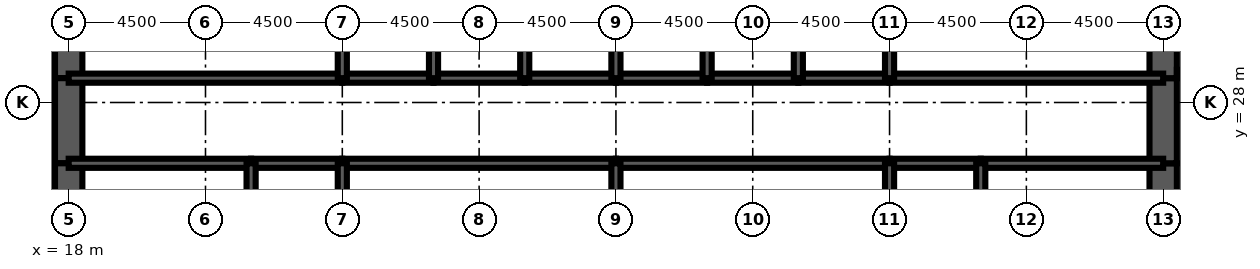
"""IFC4 building model, lengths in metres.
Left out: names, types, materials, properties, quantities, classifications, styles, units other than length and angle.
Written with IfcOpenShell. Run it as: python <this file> out.ifc"""

import sys

from ifc_helpers import new_model, si_unit, direction, frame, frame_2d, origin, place, context, subcontext, project, spatial, rectangle, extrude, element, fill, save


model = new_model("IFC4")
c1 = context("Model", 3, precision=1e-05, world=origin(), true_north=direction((0.0, 1.0)))
c2 = subcontext(c1, "Body", "Model", "MODEL_VIEW")
j1 = project(units=[si_unit("LENGTHUNIT", "METRE"), si_unit("PLANEANGLEUNIT", "RADIAN")], contexts=[c1])
p1 = place(None, origin())
s1 = spatial("IfcSite", under=j1, at=p1, CompositionType="ELEMENT")
p2 = place(p1, origin())
s2 = spatial("IfcBuilding", under=s1, at=p2, CompositionType="ELEMENT")
p3 = place(p2, origin())
s3 = spatial("IfcBuildingStorey", under=s2, at=p3, CompositionType="ELEMENT", Elevation=0.0)
p4 = place(p3, frame((18.0, 32.0, 0.0), z_axis=(0.0, 0.0, 1.0), x_axis=(0.0, -1.0, 0.0)))
e1 = element("IfcWall", 1, at=p4, inside=s3, PredefinedType="SHEAR", context=c2, shape_type="SweptSolid", body=[
    extrude(rectangle(XDim=3.2, YDim=0.9, at=frame_2d((1.6, 0.0))), origin(), (0.0, 0.0, 1.0), 6.0),
])
p5 = place(p3, frame((18.0, 28.8, 0.0), z_axis=(0.0, 0.0, 1.0), x_axis=(0.0, -1.0, 0.0)))
e2 = element("IfcWall", 2, at=p5, inside=s3, PredefinedType="SHEAR", context=c2, shape_type="SweptSolid", body=[
    extrude(rectangle(XDim=2.8, YDim=0.9, at=frame_2d((1.4, 0.0))), origin(), (0.0, 0.0, 1.0), 6.0),
])
p6 = place(p5, frame((0.4, 0.0, 0.0)))
e3 = element("IfcOpeningElement", 3, at=p6, cuts=e2, PredefinedType="OPENING", context=c2, shape_type="SweptSolid", body=[
    extrude(rectangle(XDim=1.8, YDim=2.1, at=frame_2d((0.9, 1.05))), frame((0.0, 0.46, 0.0), z_axis=(0.0, -1.0, 0.0), x_axis=(1.0, 0.0, 0.0)), (0.0, 0.0, 1.0), 0.92),
])
for number, where, z_axis, x_axis in (
    (4, (18.0, 26.0, 0.0), (0.0, 0.0, 1.0), (0.0, -1.0, 0.0)),
    (5, (54.0, 22.0, 0.0), (0.0, 0.0, 1.0), (0.0, 1.0, 0.0)),
):
    element("IfcWall", number, at=place(p3, frame(where, z_axis=z_axis, x_axis=x_axis)), inside=s3, PredefinedType="SHEAR", context=c2, shape_type="SweptSolid", body=[
        extrude(rectangle(XDim=4.0, YDim=0.9, at=frame_2d((2.0, 0.0))), origin(), (0.0, 0.0, 1.0), 6.0),
    ])
p7 = place(p3, frame((54.0, 26.0, 0.0), z_axis=(0.0, 0.0, 1.0), x_axis=(0.0, 1.0, 0.0)))
e6 = element("IfcWall", 6, at=p7, inside=s3, PredefinedType="SHEAR", context=c2, shape_type="SweptSolid", body=[
    extrude(rectangle(XDim=2.8, YDim=0.9, at=frame_2d((1.4, 0.0))), origin(), (0.0, 0.0, 1.0), 6.0),
])
p8 = place(p7, frame((0.6, 0.0, 0.0)))
e7 = element("IfcOpeningElement", 7, at=p8, cuts=e6, PredefinedType="OPENING", context=c2, shape_type="SweptSolid", body=[
    extrude(rectangle(XDim=1.8, YDim=2.1, at=frame_2d((0.9, 1.05))), frame((0.0, 0.46, 0.0), z_axis=(0.0, -1.0, 0.0), x_axis=(1.0, 0.0, 0.0)), (0.0, 0.0, 1.0), 0.92),
])
p9 = place(p3, frame((54.0, 28.8, 0.0), z_axis=(0.0, 0.0, 1.0), x_axis=(0.0, 1.0, 0.0)))
e8 = element("IfcWall", 8, at=p9, inside=s3, PredefinedType="SHEAR", context=c2, shape_type="SweptSolid", body=[
    extrude(rectangle(XDim=3.2, YDim=0.9, at=frame_2d((1.6, 0.0))), origin(), (0.0, 0.0, 1.0), 6.0),
])
p10 = place(p3, frame((18.0, 28.8, 0.0), z_axis=(0.0, 0.0, 1.0), x_axis=(1.0, 0.0, 0.0)))
e9 = element("IfcWall", 9, at=p10, inside=s3, PredefinedType="SOLIDWALL", context=c2, shape_type="SweptSolid", body=[
    extrude(rectangle(XDim=9.0, YDim=0.3, at=frame_2d((4.5, 0.0))), origin(), (0.0, 0.0, 1.0), 6.0),
])
p11 = place(p10, frame((0.65, 0.0, 0.0)))
e10 = element("IfcOpeningElement", 10, at=p11, cuts=e9, PredefinedType="OPENING", context=c2, shape_type="SweptSolid", body=[
    extrude(rectangle(XDim=1.0, YDim=2.1, at=frame_2d((0.5, 1.05))), frame((0.0, 0.16, 0.0), z_axis=(0.0, -1.0, 0.0), x_axis=(1.0, 0.0, 0.0)), (0.0, 0.0, 1.0), 0.32),
])
p12 = place(p3, frame((27.0, 28.8, 0.0), z_axis=(0.0, 0.0, 1.0), x_axis=(1.0, 0.0, 0.0)))
e11 = element("IfcWall", 11, at=p12, inside=s3, PredefinedType="SOLIDWALL", context=c2, shape_type="SweptSolid", body=[
    extrude(rectangle(XDim=3.0, YDim=0.3, at=frame_2d((1.5, 0.0))), origin(), (0.0, 0.0, 1.0), 6.0),
])
p13 = place(p12, frame((0.95, 0.0, 0.0)))
e12 = element("IfcOpeningElement", 12, at=p13, cuts=e11, PredefinedType="OPENING", context=c2, shape_type="SweptSolid", body=[
    extrude(rectangle(XDim=1.1, YDim=2.2, at=frame_2d((0.55, 1.1))), frame((0.0, 0.16, 0.0), z_axis=(0.0, -1.0, 0.0), x_axis=(1.0, 0.0, 0.0)), (0.0, 0.0, 1.0), 0.32),
])
p14 = place(p3, frame((30.0, 28.8, 0.0), z_axis=(0.0, 0.0, 1.0), x_axis=(1.0, 0.0, 0.0)))
e13 = element("IfcWall", 13, at=p14, inside=s3, PredefinedType="SOLIDWALL", context=c2, shape_type="SweptSolid", body=[
    extrude(rectangle(XDim=3.0, YDim=0.3, at=frame_2d((1.5, 0.0))), origin(), (0.0, 0.0, 1.0), 6.0),
])
p15 = place(p14, frame((0.95, 0.0, 0.0)))
e14 = element("IfcOpeningElement", 14, at=p15, cuts=e13, PredefinedType="OPENING", context=c2, shape_type="SweptSolid", body=[
    extrude(rectangle(XDim=1.1, YDim=2.2, at=frame_2d((0.55, 1.1))), frame((0.0, 0.16, 0.0), z_axis=(0.0, -1.0, 0.0), x_axis=(1.0, 0.0, 0.0)), (0.0, 0.0, 1.0), 0.32),
])
p16 = place(p3, frame((33.0, 28.8, 0.0), z_axis=(0.0, 0.0, 1.0), x_axis=(1.0, 0.0, 0.0)))
e15 = element("IfcWall", 15, at=p16, inside=s3, PredefinedType="SOLIDWALL", context=c2, shape_type="SweptSolid", body=[
    extrude(rectangle(XDim=3.0, YDim=0.3, at=frame_2d((1.5, 0.0))), origin(), (0.0, 0.0, 1.0), 6.0),
])
p17 = place(p16, frame((0.95, 0.0, 0.0)))
e16 = element("IfcOpeningElement", 16, at=p17, cuts=e15, PredefinedType="OPENING", context=c2, shape_type="SweptSolid", body=[
    extrude(rectangle(XDim=1.1, YDim=2.2, at=frame_2d((0.55, 1.1))), frame((0.0, 0.16, 0.0), z_axis=(0.0, -1.0, 0.0), x_axis=(1.0, 0.0, 0.0)), (0.0, 0.0, 1.0), 0.32),
])
p18 = place(p3, frame((36.0, 28.8, 0.0), z_axis=(0.0, 0.0, 1.0), x_axis=(1.0, 0.0, 0.0)))
e17 = element("IfcWall", 17, at=p18, inside=s3, PredefinedType="SOLIDWALL", context=c2, shape_type="SweptSolid", body=[
    extrude(rectangle(XDim=3.0, YDim=0.3, at=frame_2d((1.5, 0.0))), origin(), (0.0, 0.0, 1.0), 6.0),
])
p19 = place(p18, frame((0.95, 0.0, 0.0)))
e18 = element("IfcOpeningElement", 18, at=p19, cuts=e17, PredefinedType="OPENING", context=c2, shape_type="SweptSolid", body=[
    extrude(rectangle(XDim=1.1, YDim=2.2, at=frame_2d((0.55, 1.1))), frame((0.0, 0.16, 0.0), z_axis=(0.0, -1.0, 0.0), x_axis=(1.0, 0.0, 0.0)), (0.0, 0.0, 1.0), 0.32),
])
p20 = place(p3, frame((39.0, 28.8, 0.0), z_axis=(0.0, 0.0, 1.0), x_axis=(1.0, 0.0, 0.0)))
e19 = element("IfcWall", 19, at=p20, inside=s3, PredefinedType="SOLIDWALL", context=c2, shape_type="SweptSolid", body=[
    extrude(rectangle(XDim=3.0, YDim=0.3, at=frame_2d((1.5, 0.0))), origin(), (0.0, 0.0, 1.0), 6.0),
])
p21 = place(p20, frame((0.95, 0.0, 0.0)))
e20 = element("IfcOpeningElement", 20, at=p21, cuts=e19, PredefinedType="OPENING", context=c2, shape_type="SweptSolid", body=[
    extrude(rectangle(XDim=1.1, YDim=2.2, at=frame_2d((0.55, 1.1))), frame((0.0, 0.16, 0.0), z_axis=(0.0, -1.0, 0.0), x_axis=(1.0, 0.0, 0.0)), (0.0, 0.0, 1.0), 0.32),
])
p22 = place(p3, frame((42.0, 28.8, 0.0), z_axis=(0.0, 0.0, 1.0), x_axis=(1.0, 0.0, 0.0)))
e21 = element("IfcWall", 21, at=p22, inside=s3, PredefinedType="SOLIDWALL", context=c2, shape_type="SweptSolid", body=[
    extrude(rectangle(XDim=3.0, YDim=0.3, at=frame_2d((1.5, 0.0))), origin(), (0.0, 0.0, 1.0), 6.0),
])
p23 = place(p22, frame((0.95, 0.0, 0.0)))
e22 = element("IfcOpeningElement", 22, at=p23, cuts=e21, PredefinedType="OPENING", context=c2, shape_type="SweptSolid", body=[
    extrude(rectangle(XDim=1.1, YDim=2.2, at=frame_2d((0.55, 1.1))), frame((0.0, 0.16, 0.0), z_axis=(0.0, -1.0, 0.0), x_axis=(1.0, 0.0, 0.0)), (0.0, 0.0, 1.0), 0.32),
])
p24 = place(p3, frame((45.0, 28.8, 0.0), z_axis=(0.0, 0.0, 1.0), x_axis=(1.0, 0.0, 0.0)))
e23 = element("IfcWall", 23, at=p24, inside=s3, PredefinedType="SOLIDWALL", context=c2, shape_type="SweptSolid", body=[
    extrude(rectangle(XDim=9.0, YDim=0.3, at=frame_2d((4.5, 0.0))), origin(), (0.0, 0.0, 1.0), 6.0),
])
p25 = place(p24, frame((7.35, 0.0, 0.0)))
e24 = element("IfcOpeningElement", 24, at=p25, cuts=e23, PredefinedType="OPENING", context=c2, shape_type="SweptSolid", body=[
    extrude(rectangle(XDim=1.0, YDim=2.1, at=frame_2d((0.5, 1.05))), frame((0.0, 0.16, 0.0), z_axis=(0.0, -1.0, 0.0), x_axis=(1.0, 0.0, 0.0)), (0.0, 0.0, 1.0), 0.32),
])
p26 = place(p3, frame((18.0, 26.0, 0.0), z_axis=(0.0, 0.0, 1.0), x_axis=(1.0, 0.0, 0.0)))
e25 = element("IfcWall", 25, at=p26, inside=s3, PredefinedType="SOLIDWALL", context=c2, shape_type="SweptSolid", body=[
    extrude(rectangle(XDim=6.0, YDim=0.3, at=frame_2d((3.0, 0.0))), origin(), (0.0, 0.0, 1.0), 6.0),
])
p27 = place(p3, frame((24.0, 26.0, 0.0), z_axis=(0.0, 0.0, 1.0), x_axis=(1.0, 0.0, 0.0)))
e26 = element("IfcWall", 26, at=p27, inside=s3, PredefinedType="SOLIDWALL", context=c2, shape_type="SweptSolid", body=[
    extrude(rectangle(XDim=3.0, YDim=0.3, at=frame_2d((1.5, 0.0))), origin(), (0.0, 0.0, 1.0), 6.0),
])
for number, where, z_axis, x_axis in (
    (27, (27.0, 26.0, 0.0), (0.0, 0.0, 1.0), (1.0, 0.0, 0.0)),
    (28, (36.0, 26.0, 0.0), (0.0, 0.0, 1.0), (1.0, 0.0, 0.0)),
):
    element("IfcWall", number, at=place(p3, frame(where, z_axis=z_axis, x_axis=x_axis)), inside=s3, PredefinedType="SOLIDWALL", context=c2, shape_type="SweptSolid", body=[
        extrude(rectangle(XDim=9.0, YDim=0.3, at=frame_2d((4.5, 0.0))), origin(), (0.0, 0.0, 1.0), 6.0),
    ])
p28 = place(p3, frame((45.0, 26.0, 0.0), z_axis=(0.0, 0.0, 1.0), x_axis=(1.0, 0.0, 0.0)))
e29 = element("IfcWall", 29, at=p28, inside=s3, PredefinedType="SOLIDWALL", context=c2, shape_type="SweptSolid", body=[
    extrude(rectangle(XDim=3.0, YDim=0.3, at=frame_2d((1.5, 0.0))), origin(), (0.0, 0.0, 1.0), 6.0),
])
p29 = place(p3, frame((48.0, 26.0, 0.0), z_axis=(0.0, 0.0, 1.0), x_axis=(1.0, 0.0, 0.0)))
e30 = element("IfcWall", 30, at=p29, inside=s3, PredefinedType="SOLIDWALL", context=c2, shape_type="SweptSolid", body=[
    extrude(rectangle(XDim=6.0, YDim=0.3, at=frame_2d((3.0, 0.0))), origin(), (0.0, 0.0, 1.0), 6.0),
])
for number, where, z_axis, x_axis in (
    (31, (27.0, 28.8, 0.0), (0.0, 0.0, 1.0), (0.0, 1.0, 0.0)),
    (32, (30.0, 28.8, 0.0), (0.0, 0.0, 1.0), (0.0, 1.0, 0.0)),
    (33, (33.0, 28.8, 0.0), (0.0, 0.0, 1.0), (0.0, 1.0, 0.0)),
    (34, (36.0, 28.8, 0.0), (0.0, 0.0, 1.0), (0.0, 1.0, 0.0)),
    (35, (39.0, 28.8, 0.0), (0.0, 0.0, 1.0), (0.0, 1.0, 0.0)),
    (36, (42.0, 28.8, 0.0), (0.0, 0.0, 1.0), (0.0, 1.0, 0.0)),
    (37, (45.0, 28.8, 0.0), (0.0, 0.0, 1.0), (0.0, 1.0, 0.0)),
):
    element("IfcWall", number, at=place(p3, frame(where, z_axis=z_axis, x_axis=x_axis)), inside=s3, PredefinedType="SOLIDWALL", context=c2, shape_type="SweptSolid", body=[
        extrude(rectangle(XDim=3.2, YDim=0.3, at=frame_2d((1.6, 0.0))), origin(), (0.0, 0.0, 1.0), 6.0),
    ])
for number, where, z_axis, x_axis in (
    (38, (24.0, 22.0, 0.0), (0.0, 0.0, 1.0), (0.0, 1.0, 0.0)),
    (39, (27.0, 22.0, 0.0), (0.0, 0.0, 1.0), (0.0, 1.0, 0.0)),
    (40, (36.0, 22.0, 0.0), (0.0, 0.0, 1.0), (0.0, 1.0, 0.0)),
    (41, (45.0, 22.0, 0.0), (0.0, 0.0, 1.0), (0.0, 1.0, 0.0)),
    (42, (48.0, 22.0, 0.0), (0.0, 0.0, 1.0), (0.0, 1.0, 0.0)),
):
    element("IfcWall", number, at=place(p3, frame(where, z_axis=z_axis, x_axis=x_axis)), inside=s3, PredefinedType="SOLIDWALL", context=c2, shape_type="SweptSolid", body=[
        extrude(rectangle(XDim=4.0, YDim=0.3, at=frame_2d((2.0, 0.0))), origin(), (0.0, 0.0, 1.0), 6.0),
    ])
p30 = place(p3, frame((39.0, 22.15, 0.0), z_axis=(0.0, 0.0, 1.0), x_axis=(0.0, 1.0, 0.0)))
e43 = element("IfcWall", 43, at=p30, inside=s3, PredefinedType="PARTITIONING", context=c2, shape_type="SweptSolid", body=[
    extrude(rectangle(XDim=3.7, YDim=0.15, at=frame_2d((1.85, 0.0))), origin(), (0.0, 0.0, 1.0), 3.0),
])
p31 = place(p30, frame((2.2, 0.0, 0.0)))
e44 = element("IfcOpeningElement", 44, at=p31, cuts=e43, PredefinedType="OPENING", context=c2, shape_type="SweptSolid", body=[
    extrude(rectangle(XDim=1.0, YDim=2.1, at=frame_2d((0.5, 1.05))), frame((0.0, 0.085, 0.0), z_axis=(0.0, -1.0, 0.0), x_axis=(1.0, 0.0, 0.0)), (0.0, 0.0, 1.0), 0.17),
])
p32 = place(p3, frame((51.975, 22.15, 0.0), z_axis=(0.0, 0.0, 1.0), x_axis=(0.0, 1.0, 0.0)))
e45 = element("IfcWall", 45, at=p32, inside=s3, PredefinedType="PARTITIONING", context=c2, shape_type="SweptSolid", body=[
    extrude(rectangle(XDim=3.7, YDim=0.15, at=frame_2d((1.85, 0.0))), origin(), (0.0, 0.0, 1.0), 3.0),
])
p33 = place(p3, frame((54.45, 29.0, 0.0), z_axis=(0.0, 0.0, 1.0), x_axis=(1.0, 0.0, 0.0)))
e46 = element("IfcWall", 46, at=p33, inside=s3, PredefinedType="PARTITIONING", context=c2, shape_type="SweptSolid", body=[
    extrude(rectangle(XDim=7.55, YDim=0.15, at=frame_2d((3.775, 0.0))), origin(), (0.0, 0.0, 1.0), 3.0),
])
p34 = place(p33, frame((2.0, 0.0, 0.0)))
e47 = element("IfcOpeningElement", 47, at=p34, cuts=e46, PredefinedType="OPENING", context=c2, shape_type="SweptSolid", body=[
    extrude(rectangle(XDim=1.8, YDim=2.1, at=frame_2d((0.9, 1.05))), frame((0.0, 0.085, 0.0), z_axis=(0.0, -1.0, 0.0), x_axis=(1.0, 0.0, 0.0)), (0.0, 0.0, 1.0), 0.17),
])
p35 = place(p31, origin())
e48 = element("IfcDoor", 48, at=p35, inside=s3, OperationType="SINGLE_SWING_RIGHT", PredefinedType="DOOR", context=c2, shape_type="SweptSolid", body=[
    extrude(rectangle(XDim=1.0, YDim=2.1, at=frame_2d((0.5, 1.05))), frame((0.0, 0.025, 0.0), z_axis=(0.0, -1.0, 0.0), x_axis=(1.0, 0.0, 0.0)), (0.0, 0.0, 1.0), 0.05),
])
fill(e44, e48)
p36 = place(p23, origin())
e49 = element("IfcDoor", 49, at=p36, inside=s3, OperationType="DOUBLE_DOOR_SLIDING", PredefinedType="USERDEFINED", context=c2, shape_type="SweptSolid", body=[
    extrude(rectangle(XDim=1.1, YDim=2.2, at=frame_2d((0.55, 1.1))), frame((0.0, 0.025, 0.0), z_axis=(0.0, -1.0, 0.0), x_axis=(1.0, 0.0, 0.0)), (0.0, 0.0, 1.0), 0.05),
])
fill(e22, e49)
p37 = place(p13, origin())
e50 = element("IfcDoor", 50, at=p37, inside=s3, OperationType="DOUBLE_DOOR_SLIDING", PredefinedType="USERDEFINED", context=c2, shape_type="SweptSolid", body=[
    extrude(rectangle(XDim=1.1, YDim=2.2, at=frame_2d((0.55, 1.1))), frame((0.0, 0.025, 0.0), z_axis=(0.0, -1.0, 0.0), x_axis=(1.0, 0.0, 0.0)), (0.0, 0.0, 1.0), 0.05),
])
fill(e12, e50)
p38 = place(p19, origin())
e51 = element("IfcDoor", 51, at=p38, inside=s3, OperationType="DOUBLE_DOOR_SLIDING", PredefinedType="USERDEFINED", context=c2, shape_type="SweptSolid", body=[
    extrude(rectangle(XDim=1.1, YDim=2.2, at=frame_2d((0.55, 1.1))), frame((0.0, 0.025, 0.0), z_axis=(0.0, -1.0, 0.0), x_axis=(1.0, 0.0, 0.0)), (0.0, 0.0, 1.0), 0.05),
])
fill(e18, e51)
p39 = place(p21, origin())
e52 = element("IfcDoor", 52, at=p39, inside=s3, OperationType="DOUBLE_DOOR_SLIDING", PredefinedType="USERDEFINED", context=c2, shape_type="SweptSolid", body=[
    extrude(rectangle(XDim=1.1, YDim=2.2, at=frame_2d((0.55, 1.1))), frame((0.0, 0.025, 0.0), z_axis=(0.0, -1.0, 0.0), x_axis=(1.0, 0.0, 0.0)), (0.0, 0.0, 1.0), 0.05),
])
fill(e20, e52)
p40 = place(p15, origin())
e53 = element("IfcDoor", 53, at=p40, inside=s3, OperationType="DOUBLE_DOOR_SLIDING", PredefinedType="USERDEFINED", context=c2, shape_type="SweptSolid", body=[
    extrude(rectangle(XDim=1.1, YDim=2.2, at=frame_2d((0.55, 1.1))), frame((0.0, 0.025, 0.0), z_axis=(0.0, -1.0, 0.0), x_axis=(1.0, 0.0, 0.0)), (0.0, 0.0, 1.0), 0.05),
])
fill(e14, e53)
p41 = place(p17, origin())
e54 = element("IfcDoor", 54, at=p41, inside=s3, OperationType="DOUBLE_DOOR_SLIDING", PredefinedType="USERDEFINED", context=c2, shape_type="SweptSolid", body=[
    extrude(rectangle(XDim=1.1, YDim=2.2, at=frame_2d((0.55, 1.1))), frame((0.0, 0.025, 0.0), z_axis=(0.0, -1.0, 0.0), x_axis=(1.0, 0.0, 0.0)), (0.0, 0.0, 1.0), 0.05),
])
fill(e16, e54)
p42 = place(p11, origin())
e55 = element("IfcDoor", 55, at=p42, inside=s3, OperationType="SINGLE_SWING_LEFT", PredefinedType="DOOR", context=c2, shape_type="SweptSolid", body=[
    extrude(rectangle(XDim=1.0, YDim=2.1, at=frame_2d((0.5, 1.05))), frame((0.0, 0.025, 0.0), z_axis=(0.0, -1.0, 0.0), x_axis=(1.0, 0.0, 0.0)), (0.0, 0.0, 1.0), 0.05),
])
fill(e10, e55)
p43 = place(p25, origin())
e56 = element("IfcDoor", 56, at=p43, inside=s3, OperationType="SINGLE_SWING_RIGHT", PredefinedType="DOOR", context=c2, shape_type="SweptSolid", body=[
    extrude(rectangle(XDim=1.0, YDim=2.1, at=frame_2d((0.5, 1.05))), frame((0.0, 0.025, 0.0), z_axis=(0.0, -1.0, 0.0), x_axis=(1.0, 0.0, 0.0)), (0.0, 0.0, 1.0), 0.05),
])
fill(e24, e56)
p44 = place(p6, origin())
e57 = element("IfcDoor", 57, at=p44, inside=s3, OperationType="SINGLE_SWING_LEFT", PredefinedType="DOOR", context=c2, shape_type="SweptSolid", body=[
    extrude(rectangle(XDim=1.8, YDim=2.1, at=frame_2d((0.9, 1.05))), frame((0.0, 0.45, 0.0), z_axis=(0.0, -1.0, 0.0), x_axis=(1.0, 0.0, 0.0)), (0.0, 0.0, 1.0), 0.899),
])
fill(e3, e57)
p45 = place(p8, origin())
e58 = element("IfcDoor", 58, at=p45, inside=s3, OperationType="SINGLE_SWING_LEFT", PredefinedType="DOOR", context=c2, shape_type="SweptSolid", body=[
    extrude(rectangle(XDim=1.8, YDim=2.1, at=frame_2d((0.9, 1.05))), frame((0.0, 0.45, 0.0), z_axis=(0.0, -1.0, 0.0), x_axis=(1.0, 0.0, 0.0)), (0.0, 0.0, 1.0), 0.899),
])
fill(e7, e58)
save(model, sys.argv[1])
